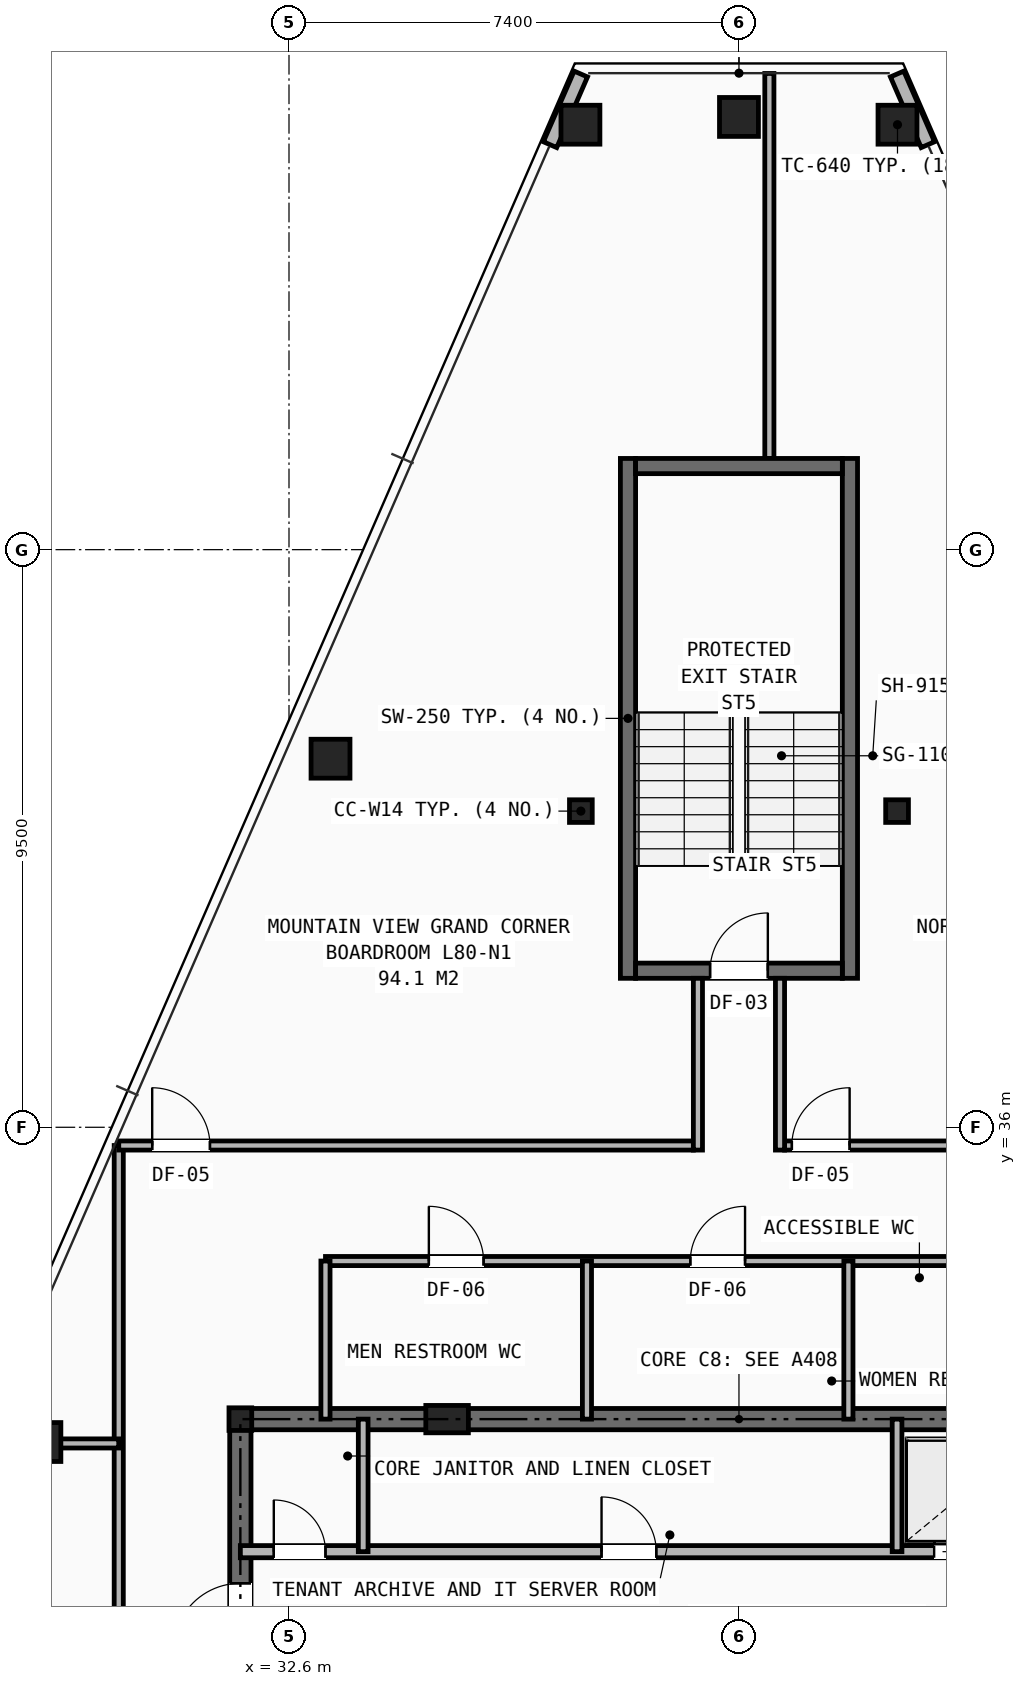
"""IFC4 building model, lengths in metres.
Left out: names, types, materials, properties, quantities, classifications, styles, units other than length and angle.
Written with IfcOpenShell. Run it as: python <this file> out.ifc"""

import sys

from ifc_helpers import new_model, si_unit, direction, frame, frame_2d, origin, origin_2d, place, context, subcontext, project, spatial, rectangle, hollow_rectangle, i_section, extrude, element, fill, save


model = new_model("IFC4")
c1 = context("Model", 3, precision=1e-05, world=origin(), true_north=direction((0.0, 1.0)))
c2 = subcontext(c1, "Body", "Model", "MODEL_VIEW")
j1 = project(units=[si_unit("LENGTHUNIT", "METRE"), si_unit("PLANEANGLEUNIT", "RADIAN")], contexts=[c1])
p1 = place(None, origin())
s1 = spatial("IfcSite", under=j1, at=p1, CompositionType="ELEMENT")
p2 = place(p1, origin())
s2 = spatial("IfcBuilding", under=s1, at=p2, CompositionType="ELEMENT")
p3 = place(p2, frame((0.0, 0.0, 283.0)))
s3 = spatial("IfcBuildingStorey", under=s2, at=p3, CompositionType="ELEMENT", Elevation=283.0)
for number, where, z_axis, x_axis in (
    (1, (31.8, 31.2, 0.0), (0.0, 0.0, 1.0), (1.0, 0.0, 0.0)),
    (2, (37.4, 41.2, 0.0), (0.0, 0.0, 1.0), (1.0, 0.0, 0.0)),
    (3, (42.6, 41.2, 0.0), (0.0, 0.0, 1.0), (1.0, 0.0, 0.0)),
):
    element("IfcColumn", number, at=place(p3, frame(where, z_axis=z_axis, x_axis=x_axis)), inside=s3, PredefinedType="COLUMN", context=c2, shape_type="SweptSolid", body=[
        extrude(i_section(OverallWidth=0.374, OverallDepth=0.372, WebThickness=0.016, FlangeThickness=0.026, at=origin_2d()), origin(), (0.0, 0.0, 1.0), 3.5),
    ])
p4 = place(p3, frame((35.2, 31.2, 0.0), z_axis=(0.0, 0.0, 1.0), x_axis=(1.0, 0.0, 0.0)))
e4 = element("IfcColumn", 4, at=p4, inside=s3, PredefinedType="PILASTER", context=c2, shape_type="SweptSolid", body=[
    extrude(rectangle(XDim=0.7, YDim=0.45, at=origin_2d()), origin(), (0.0, 0.0, 1.0), 3.5),
])
for number, where, z_axis, x_axis in (
    (5, (42.607, 52.489, 0.0), (0.0, 0.0, 1.0), (1.0, 0.0, 0.0)),
    (6, (40.0, 52.617, 0.0), (0.0, 0.0, 1.0), (1.0, 0.0, 0.0)),
    (7, (37.393, 52.489, 0.0), (0.0, 0.0, 1.0), (1.0, 0.0, 0.0)),
    (8, (33.283, 42.062, 0.0), (0.0, 0.0, 1.0), (1.0, 0.0, 0.0)),
    (9, (28.528, 30.823, 0.0), (0.0, 0.0, 1.0), (1.0, 0.0, 0.0)),
):
    element("IfcColumn", number, at=place(p3, frame(where, z_axis=z_axis, x_axis=x_axis)), inside=s3, PredefinedType="COLUMN", context=c2, shape_type="SweptSolid", body=[
        extrude(hollow_rectangle(XDim=0.64, YDim=0.64, WallThickness=0.045, at=origin_2d()), origin(), (0.0, 0.0, 1.0), 3.5),
    ])
for number, where, z_axis, x_axis in (
    (10, (37.399, 53.323, 0.0), (0.0, 0.0, 1.0), (-0.399, -0.917, 0.0)),
    (11, (43.107, 52.161, 0.0), (0.0, 0.0, 1.0), (-0.399, 0.917, 0.0)),
):
    element("IfcWall", number, at=place(p3, frame(where, z_axis=z_axis, x_axis=x_axis)), inside=s3, PredefinedType="SHEAR", context=c2, shape_type="SweptSolid", body=[
        extrude(rectangle(XDim=1.268, YDim=0.24, at=frame_2d((0.634, 0.0))), origin(), (0.0, 0.0, 1.0), 2.623),
    ])
p5 = place(p3, frame((31.8, 31.2, 0.0), z_axis=(0.0, 0.0, 1.0), x_axis=(1.0, 0.0, 0.0)))
e12 = element("IfcWall", 12, at=p5, inside=s3, PredefinedType="SHEAR", context=c2, shape_type="SweptSolid", body=[
    extrude(rectangle(XDim=16.4, YDim=0.35, at=frame_2d((8.2, 0.0))), origin(), (0.0, 0.0, 1.0), 3.25),
])
p6 = place(p3, frame((31.8, 16.4, 0.0), z_axis=(0.0, 0.0, 1.0), x_axis=(0.0, 1.0, 0.0)))
e13 = element("IfcWall", 13, at=p6, inside=s3, PredefinedType="SHEAR", context=c2, shape_type="SweptSolid", body=[
    extrude(rectangle(XDim=14.8, YDim=0.35, at=frame_2d((7.4, 0.0))), origin(), (0.0, 0.0, 1.0), 3.25),
])
p7 = place(p6, frame((11.0, 0.0, 0.0)))
e14 = element("IfcOpeningElement", 14, at=p7, cuts=e13, PredefinedType="OPENING", context=c2, shape_type="SweptSolid", body=[
    extrude(rectangle(XDim=1.1, YDim=2.15, at=frame_2d((0.55, 1.075))), frame((0.0, 0.185, 0.0), z_axis=(0.0, -1.0, 0.0), x_axis=(1.0, 0.0, 0.0)), (0.0, 0.0, 1.0), 0.37),
])
p8 = place(p3, frame((31.8, 29.02, 0.0), z_axis=(0.0, 0.0, 1.0), x_axis=(1.0, 0.0, 0.0)))
e15 = element("IfcWall", 15, at=p8, inside=s3, PredefinedType="SOLIDWALL", context=c2, shape_type="SweptSolid", body=[
    extrude(rectangle(XDim=16.4, YDim=0.2, at=frame_2d((8.2, 0.0))), origin(), (0.0, 0.0, 1.0), 2.705),
])
p9 = place(p8, frame((0.55, 0.0, 0.0)))
e16 = element("IfcOpeningElement", 16, at=p9, cuts=e15, PredefinedType="OPENING", context=c2, shape_type="SweptSolid", body=[
    extrude(rectangle(XDim=0.85, YDim=2.05, at=frame_2d((0.425, 1.025))), frame((0.0, 0.11, 0.0), z_axis=(0.0, -1.0, 0.0), x_axis=(1.0, 0.0, 0.0)), (0.0, 0.0, 1.0), 0.22),
])
p10 = place(p8, frame((5.94, 0.0, 0.0)))
e17 = element("IfcOpeningElement", 17, at=p10, cuts=e15, PredefinedType="OPENING", context=c2, shape_type="SweptSolid", body=[
    extrude(rectangle(XDim=0.9, YDim=2.1, at=frame_2d((0.45, 1.05))), frame((0.0, 0.11, 0.0), z_axis=(0.0, -1.0, 0.0), x_axis=(1.0, 0.0, 0.0)), (0.0, 0.0, 1.0), 0.22),
])
p11 = place(p8, frame((11.41, 0.0, 0.0)))
e18 = element("IfcOpeningElement", 18, at=p11, cuts=e15, PredefinedType="OPENING", context=c2, shape_type="SweptSolid", body=[
    extrude(rectangle(XDim=1.1, YDim=2.15, at=frame_2d((0.55, 1.075))), frame((0.0, 0.11, 0.0), z_axis=(0.0, -1.0, 0.0), x_axis=(1.0, 0.0, 0.0)), (0.0, 0.0, 1.0), 0.22),
])
p12 = place(p8, frame((13.73, 0.0, 0.0)))
e19 = element("IfcOpeningElement", 19, at=p12, cuts=e15, PredefinedType="OPENING", context=c2, shape_type="SweptSolid", body=[
    extrude(rectangle(XDim=1.1, YDim=2.15, at=frame_2d((0.55, 1.075))), frame((0.0, 0.11, 0.0), z_axis=(0.0, -1.0, 0.0), x_axis=(1.0, 0.0, 0.0)), (0.0, 0.0, 1.0), 0.22),
])
for number, where, z_axis, x_axis in (
    (20, (33.82, 29.02, 0.0), (0.0, 0.0, 1.0), (0.0, 1.0, 0.0)),
    (21, (42.6, 29.02, 0.0), (0.0, 0.0, 1.0), (0.0, 1.0, 0.0)),
):
    element("IfcWall", number, at=place(p3, frame(where, z_axis=z_axis, x_axis=x_axis)), inside=s3, PredefinedType="SOLIDWALL", context=c2, shape_type="SweptSolid", body=[
        extrude(rectangle(XDim=2.18, YDim=0.16, at=frame_2d((1.09, 0.0))), origin(), (0.0, 0.0, 1.0), 2.978),
    ])
p13 = place(p3, frame((33.2, 33.8, 0.0), z_axis=(0.0, 0.0, 1.0), x_axis=(1.0, 0.0, 0.0)))
e22 = element("IfcWall", 22, at=p13, inside=s3, PredefinedType="PARTITIONING", context=c2, shape_type="SweptSolid", body=[
    extrude(rectangle(XDim=13.0, YDim=0.15, at=frame_2d((6.5, 0.0))), origin(), (0.0, 0.0, 1.0), 3.25),
])
p14 = place(p13, frame((1.7, 0.0, 0.0)))
e23 = element("IfcOpeningElement", 23, at=p14, cuts=e22, PredefinedType="OPENING", context=c2, shape_type="SweptSolid", body=[
    extrude(rectangle(XDim=0.9, YDim=2.1, at=frame_2d((0.45, 1.05))), frame((0.0, 0.085, 0.0), z_axis=(0.0, -1.0, 0.0), x_axis=(1.0, 0.0, 0.0)), (0.0, 0.0, 1.0), 0.17),
])
p15 = place(p13, frame((6.0, 0.0, 0.0)))
e24 = element("IfcOpeningElement", 24, at=p15, cuts=e22, PredefinedType="OPENING", context=c2, shape_type="SweptSolid", body=[
    extrude(rectangle(XDim=0.9, YDim=2.1, at=frame_2d((0.45, 1.05))), frame((0.0, 0.085, 0.0), z_axis=(0.0, -1.0, 0.0), x_axis=(1.0, 0.0, 0.0)), (0.0, 0.0, 1.0), 0.17),
])
p16 = place(p13, frame((10.35, 0.0, 0.0)))
e25 = element("IfcOpeningElement", 25, at=p16, cuts=e22, PredefinedType="OPENING", context=c2, shape_type="SweptSolid", body=[
    extrude(rectangle(XDim=0.9, YDim=2.1, at=frame_2d((0.45, 1.05))), frame((0.0, 0.085, 0.0), z_axis=(0.0, -1.0, 0.0), x_axis=(1.0, 0.0, 0.0)), (0.0, 0.0, 1.0), 0.17),
])
for number, where, z_axis, x_axis in (
    (26, (33.2, 31.2, 0.0), (0.0, 0.0, 1.0), (0.0, 1.0, 0.0)),
    (27, (37.5, 31.2, 0.0), (0.0, 0.0, 1.0), (0.0, 1.0, 0.0)),
    (28, (41.8, 31.2, 0.0), (0.0, 0.0, 1.0), (0.0, 1.0, 0.0)),
):
    element("IfcWall", number, at=place(p3, frame(where, z_axis=z_axis, x_axis=x_axis)), inside=s3, PredefinedType="PARTITIONING", context=c2, shape_type="SweptSolid", body=[
        extrude(rectangle(XDim=2.6, YDim=0.15, at=frame_2d((1.3, 0.0))), origin(), (0.0, 0.0, 1.0), 2.978),
    ])
p17 = place(p3, frame((29.8, 16.4, 0.0), z_axis=(0.0, 0.0, 1.0), x_axis=(0.0, 1.0, 0.0)))
e29 = element("IfcWall", 29, at=p17, inside=s3, PredefinedType="PARTITIONING", context=c2, shape_type="SweptSolid", body=[
    extrude(rectangle(XDim=19.3, YDim=0.15, at=frame_2d((9.65, 0.0))), origin(), (0.0, 0.0, 1.0), 2.265),
])
p18 = place(p17, frame((0.35, 0.0, 0.0)))
e30 = element("IfcOpeningElement", 30, at=p18, cuts=e29, PredefinedType="OPENING", context=c2, shape_type="SweptSolid", body=[
    extrude(rectangle(XDim=0.95, YDim=2.1, at=frame_2d((0.475, 1.05))), frame((0.0, 0.085, 0.0), z_axis=(0.0, -1.0, 0.0), x_axis=(1.0, 0.0, 0.0)), (0.0, 0.0, 1.0), 0.17),
])
p19 = place(p17, frame((4.15, 0.0, 0.0)))
e31 = element("IfcOpeningElement", 31, at=p19, cuts=e29, PredefinedType="OPENING", context=c2, shape_type="SweptSolid", body=[
    extrude(rectangle(XDim=0.95, YDim=2.1, at=frame_2d((0.475, 1.05))), frame((0.0, 0.085, 0.0), z_axis=(0.0, -1.0, 0.0), x_axis=(1.0, 0.0, 0.0)), (0.0, 0.0, 1.0), 0.17),
])
p20 = place(p17, frame((9.45, 0.0, 0.0)))
e32 = element("IfcOpeningElement", 32, at=p20, cuts=e29, PredefinedType="OPENING", context=c2, shape_type="SweptSolid", body=[
    extrude(rectangle(XDim=0.95, YDim=2.1, at=frame_2d((0.475, 1.05))), frame((0.0, 0.085, 0.0), z_axis=(0.0, -1.0, 0.0), x_axis=(1.0, 0.0, 0.0)), (0.0, 0.0, 1.0), 0.17),
])
p21 = place(p3, frame((29.8, 35.7, 0.0), z_axis=(0.0, 0.0, 1.0), x_axis=(1.0, 0.0, 0.0)))
e33 = element("IfcWall", 33, at=p21, inside=s3, PredefinedType="PARTITIONING", context=c2, shape_type="SweptSolid", body=[
    extrude(rectangle(XDim=9.45, YDim=0.15, at=frame_2d((4.725, 0.0))), origin(), (0.0, 0.0, 1.0), 2.628),
])
p22 = place(p21, frame((0.55, 0.0, 0.0)))
e34 = element("IfcOpeningElement", 34, at=p22, cuts=e33, PredefinedType="OPENING", context=c2, shape_type="SweptSolid", body=[
    extrude(rectangle(XDim=0.95, YDim=2.1, at=frame_2d((0.475, 1.05))), frame((0.0, 0.085, 0.0), z_axis=(0.0, -1.0, 0.0), x_axis=(1.0, 0.0, 0.0)), (0.0, 0.0, 1.0), 0.17),
])
p23 = place(p3, frame((40.75, 35.7, 0.0), z_axis=(0.0, 0.0, 1.0), x_axis=(1.0, 0.0, 0.0)))
e35 = element("IfcWall", 35, at=p23, inside=s3, PredefinedType="PARTITIONING", context=c2, shape_type="SweptSolid", body=[
    extrude(rectangle(XDim=6.05, YDim=0.15, at=frame_2d((3.025, 0.0))), origin(), (0.0, 0.0, 1.0), 3.25),
])
p24 = place(p23, frame((0.12, 0.0, 0.0)))
e36 = element("IfcOpeningElement", 36, at=p24, cuts=e35, PredefinedType="OPENING", context=c2, shape_type="SweptSolid", body=[
    extrude(rectangle(XDim=0.95, YDim=2.1, at=frame_2d((0.475, 1.05))), frame((0.0, 0.085, 0.0), z_axis=(0.0, -1.0, 0.0), x_axis=(1.0, 0.0, 0.0)), (0.0, 0.0, 1.0), 0.17),
])
p25 = place(p3, frame((27.466, 30.8, 0.0), z_axis=(0.0, 0.0, 1.0), x_axis=(1.0, 0.0, 0.0)))
e37 = element("IfcWall", 37, at=p25, inside=s3, PredefinedType="PARTITIONING", context=c2, shape_type="SweptSolid", body=[
    extrude(rectangle(XDim=2.334, YDim=0.15, at=frame_2d((1.167, 0.0))), origin(), (0.0, 0.0, 1.0), 2.265),
])
p26 = place(p3, frame((40.5, 47.0, 0.0), z_axis=(0.0, 0.0, 1.0), x_axis=(0.0, 1.0, 0.0)))
e38 = element("IfcWall", 38, at=p26, inside=s3, PredefinedType="PARTITIONING", context=c2, shape_type="SweptSolid", body=[
    extrude(rectangle(XDim=6.332, YDim=0.15, at=frame_2d((3.166, 0.0))), origin(), (0.0, 0.0, 1.0), 2.628),
])
for number, where, z_axis, x_axis in (
    (39, (38.175, 38.45, 0.0), (0.0, 0.0, 1.0), (0.0, 1.0, 0.0)),
    (40, (41.825, 38.45, 0.0), (0.0, 0.0, 1.0), (0.0, 1.0, 0.0)),
):
    element("IfcWall", number, at=place(p3, frame(where, z_axis=z_axis, x_axis=x_axis)), inside=s3, PredefinedType="SHEAR", context=c2, shape_type="SweptSolid", body=[
        extrude(rectangle(XDim=8.55, YDim=0.25, at=frame_2d((4.275, 0.0))), origin(), (0.0, 0.0, 1.0), 3.25),
    ])
p27 = place(p3, frame((38.3, 38.575, 0.0), z_axis=(0.0, 0.0, 1.0), x_axis=(1.0, 0.0, 0.0)))
e41 = element("IfcWall", 41, at=p27, inside=s3, PredefinedType="SHEAR", context=c2, shape_type="SweptSolid", body=[
    extrude(rectangle(XDim=3.4, YDim=0.25, at=frame_2d((1.7, 0.0))), origin(), (0.0, 0.0, 1.0), 3.25),
])
p28 = place(p27, frame((1.225, 0.0, 0.0)))
e42 = element("IfcOpeningElement", 42, at=p28, cuts=e41, PredefinedType="OPENING", context=c2, shape_type="SweptSolid", body=[
    extrude(rectangle(XDim=0.95, YDim=2.1, at=frame_2d((0.475, 1.05))), frame((0.0, 0.135, 0.0), z_axis=(0.0, -1.0, 0.0), x_axis=(1.0, 0.0, 0.0)), (0.0, 0.0, 1.0), 0.27),
])
p29 = place(p3, frame((38.3, 46.875, 0.0), z_axis=(0.0, 0.0, 1.0), x_axis=(1.0, 0.0, 0.0)))
e43 = element("IfcWall", 43, at=p29, inside=s3, PredefinedType="SHEAR", context=c2, shape_type="SweptSolid", body=[
    extrude(rectangle(XDim=3.4, YDim=0.25, at=frame_2d((1.7, 0.0))), origin(), (0.0, 0.0, 1.0), 3.25),
])
for number, where, z_axis, x_axis in (
    (44, (39.325, 35.625, 0.0), (0.0, 0.0, 1.0), (0.0, 1.0, 0.0)),
    (45, (40.675, 35.625, 0.0), (0.0, 0.0, 1.0), (0.0, 1.0, 0.0)),
):
    element("IfcWall", number, at=place(p3, frame(where, z_axis=z_axis, x_axis=x_axis)), inside=s3, PredefinedType="PARTITIONING", context=c2, shape_type="SweptSolid", body=[
        extrude(rectangle(XDim=2.825, YDim=0.15, at=frame_2d((1.413, 0.0))), origin(), (0.0, 0.0, 1.0), 3.25),
    ])
p30 = place(p9, origin())
e46 = element("IfcDoor", 46, at=p30, inside=s3, OperationType="SINGLE_SWING_LEFT", PredefinedType="DOOR", context=c2, shape_type="SweptSolid", body=[
    extrude(rectangle(XDim=0.85, YDim=2.05, at=frame_2d((0.425, 1.025))), frame((0.0, 0.025, 0.0), z_axis=(0.0, -1.0, 0.0), x_axis=(1.0, 0.0, 0.0)), (0.0, 0.0, 1.0), 0.05),
])
fill(e16, e46)
p31 = place(p7, origin())
e47 = element("IfcDoor", 47, at=p31, inside=s3, OperationType="SINGLE_SWING_LEFT", PredefinedType="DOOR", context=c2, shape_type="SweptSolid", body=[
    extrude(rectangle(XDim=1.1, YDim=2.15, at=frame_2d((0.55, 1.075))), frame((0.0, 0.025, 0.0), z_axis=(0.0, -1.0, 0.0), x_axis=(1.0, 0.0, 0.0)), (0.0, 0.0, 1.0), 0.05),
])
fill(e14, e47)
p32 = place(p10, origin())
e48 = element("IfcDoor", 48, at=p32, inside=s3, OperationType="SINGLE_SWING_LEFT", PredefinedType="DOOR", context=c2, shape_type="SweptSolid", body=[
    extrude(rectangle(XDim=0.9, YDim=2.1, at=frame_2d((0.45, 1.05))), frame((0.0, 0.025, 0.0), z_axis=(0.0, -1.0, 0.0), x_axis=(1.0, 0.0, 0.0)), (0.0, 0.0, 1.0), 0.05),
])
fill(e17, e48)
p33 = place(p11, origin())
e49 = element("IfcDoor", 49, at=p33, inside=s3, OperationType="DOUBLE_DOOR_SLIDING", PredefinedType="DOOR", context=c2, shape_type="SweptSolid", body=[
    extrude(rectangle(XDim=1.1, YDim=2.15, at=frame_2d((0.55, 1.075))), frame((0.0, 0.025, 0.0), z_axis=(0.0, -1.0, 0.0), x_axis=(1.0, 0.0, 0.0)), (0.0, 0.0, 1.0), 0.05),
])
fill(e18, e49)
p34 = place(p14, origin())
e50 = element("IfcDoor", 50, at=p34, inside=s3, OperationType="SINGLE_SWING_LEFT", PredefinedType="DOOR", context=c2, shape_type="SweptSolid", body=[
    extrude(rectangle(XDim=0.9, YDim=2.1, at=frame_2d((0.45, 1.05))), frame((0.0, 0.025, 0.0), z_axis=(0.0, -1.0, 0.0), x_axis=(1.0, 0.0, 0.0)), (0.0, 0.0, 1.0), 0.05),
])
fill(e23, e50)
p35 = place(p15, origin())
e51 = element("IfcDoor", 51, at=p35, inside=s3, OperationType="SINGLE_SWING_RIGHT", PredefinedType="DOOR", context=c2, shape_type="SweptSolid", body=[
    extrude(rectangle(XDim=0.9, YDim=2.1, at=frame_2d((0.45, 1.05))), frame((0.0, 0.025, 0.0), z_axis=(0.0, -1.0, 0.0), x_axis=(1.0, 0.0, 0.0)), (0.0, 0.0, 1.0), 0.05),
])
fill(e24, e51)
p36 = place(p22, origin())
e52 = element("IfcDoor", 52, at=p36, inside=s3, OperationType="SINGLE_SWING_LEFT", PredefinedType="DOOR", context=c2, shape_type="SweptSolid", body=[
    extrude(rectangle(XDim=0.95, YDim=2.1, at=frame_2d((0.475, 1.05))), frame((0.0, 0.025, 0.0), z_axis=(0.0, -1.0, 0.0), x_axis=(1.0, 0.0, 0.0)), (0.0, 0.0, 1.0), 0.05),
])
fill(e34, e52)
p37 = place(p24, origin())
e53 = element("IfcDoor", 53, at=p37, inside=s3, OperationType="SINGLE_SWING_RIGHT", PredefinedType="DOOR", context=c2, shape_type="SweptSolid", body=[
    extrude(rectangle(XDim=0.95, YDim=2.1, at=frame_2d((0.475, 1.05))), frame((0.0, 0.025, 0.0), z_axis=(0.0, -1.0, 0.0), x_axis=(1.0, 0.0, 0.0)), (0.0, 0.0, 1.0), 0.05),
])
fill(e36, e53)
p38 = place(p28, origin())
e54 = element("IfcDoor", 54, at=p38, inside=s3, OperationType="SINGLE_SWING_RIGHT", PredefinedType="DOOR", context=c2, shape_type="SweptSolid", body=[
    extrude(rectangle(XDim=0.95, YDim=2.1, at=frame_2d((0.475, 1.05))), frame((0.0, 0.025, 0.0), z_axis=(0.0, -1.0, 0.0), x_axis=(1.0, 0.0, 0.0)), (0.0, 0.0, 1.0), 0.05),
])
fill(e42, e54)
save(model, sys.argv[1])
